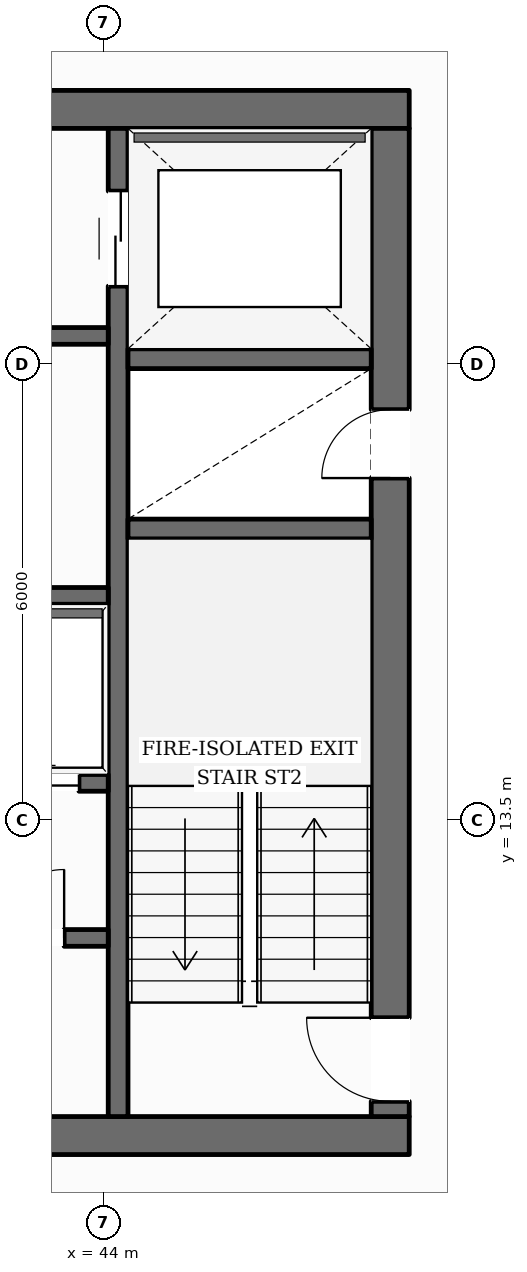
"""IFC4 building model, lengths in metres.
Left out: names, types, materials, properties, quantities, classifications, styles, units other than length and angle.
Written with IfcOpenShell. Run it as: python <this file> out.ifc"""

import sys

from ifc_helpers import new_model, si_unit, direction, frame, frame_2d, origin, place, context, subcontext, project, spatial, rectangle, extrude, element, fill, save


model = new_model("IFC4")
c1 = context("Model", 3, precision=1e-05, world=origin(), true_north=direction((0.0, 1.0)))
c2 = subcontext(c1, "Body", "Model", "MODEL_VIEW")
j1 = project(units=[si_unit("LENGTHUNIT", "METRE"), si_unit("PLANEANGLEUNIT", "RADIAN")], contexts=[c1])
p1 = place(None, origin())
s1 = spatial("IfcSite", under=j1, at=p1, CompositionType="ELEMENT")
p2 = place(p1, origin())
s2 = spatial("IfcBuilding", under=s1, at=p2, CompositionType="ELEMENT")
p3 = place(p2, frame((0.0, 0.0, 150.95)))
s3 = spatial("IfcBuildingStorey", under=s2, at=p3, CompositionType="ELEMENT", Elevation=150.95)
p4 = place(p3, frame((27.98, 9.35, 0.0), z_axis=(0.0, 0.0, 1.0), x_axis=(1.0, 0.0, 0.0)))
e1 = element("IfcWall", 1, at=p4, inside=s3, PredefinedType="SOLIDWALL", context=c2, shape_type="SweptSolid", body=[
    extrude(rectangle(XDim=20.04, YDim=0.5, at=frame_2d((10.02, 0.0))), origin(), (0.0, 0.0, 1.0), 3.43),
])
p5 = place(p4, frame((10.52, 0.0, 0.0)))
e2 = element("IfcOpeningElement", 2, at=p5, cuts=e1, PredefinedType="OPENING", context=c2, shape_type="SweptSolid", body=[
    extrude(rectangle(XDim=1.4, YDim=2.2, at=frame_2d((0.7, 1.1))), frame((0.0, 0.26, 0.0), z_axis=(0.0, -1.0, 0.0), x_axis=(1.0, 0.0, 0.0)), (0.0, 0.0, 1.0), 0.52),
])
p6 = place(p3, frame((27.98, 22.85, 0.0), z_axis=(0.0, 0.0, 1.0), x_axis=(1.0, 0.0, 0.0)))
e3 = element("IfcWall", 3, at=p6, inside=s3, PredefinedType="SOLIDWALL", context=c2, shape_type="SweptSolid", body=[
    extrude(rectangle(XDim=20.04, YDim=0.5, at=frame_2d((10.02, 0.0))), origin(), (0.0, 0.0, 1.0), 3.43),
])
p7 = place(p6, frame((6.295, 0.0, 0.0)))
e4 = element("IfcOpeningElement", 4, at=p7, cuts=e3, PredefinedType="OPENING", context=c2, shape_type="SweptSolid", body=[
    extrude(rectangle(XDim=1.05, YDim=2.15, at=frame_2d((0.525, 1.075))), frame((0.0, 0.26, 0.0), z_axis=(0.0, -1.0, 0.0), x_axis=(1.0, 0.0, 0.0)), (0.0, 0.0, 1.0), 0.52),
])
p8 = place(p6, frame((12.695, 0.0, 0.0)))
e5 = element("IfcOpeningElement", 5, at=p8, cuts=e3, PredefinedType="OPENING", context=c2, shape_type="SweptSolid", body=[
    extrude(rectangle(XDim=1.05, YDim=2.15, at=frame_2d((0.525, 1.075))), frame((0.0, 0.26, 0.0), z_axis=(0.0, -1.0, 0.0), x_axis=(1.0, 0.0, 0.0)), (0.0, 0.0, 1.0), 0.52),
])
p9 = place(p3, frame((47.77, 9.6, 0.0), z_axis=(0.0, 0.0, 1.0), x_axis=(0.0, 1.0, 0.0)))
e6 = element("IfcWall", 6, at=p9, inside=s3, PredefinedType="SOLIDWALL", context=c2, shape_type="SweptSolid", body=[
    extrude(rectangle(XDim=13.0, YDim=0.5, at=frame_2d((6.5, 0.0))), origin(), (0.0, 0.0, 1.0), 3.43),
])
p10 = place(p9, frame((0.2, 0.0, 0.0)))
e7 = element("IfcOpeningElement", 7, at=p10, cuts=e6, PredefinedType="OPENING", context=c2, shape_type="SweptSolid", body=[
    extrude(rectangle(XDim=1.1, YDim=2.15, at=frame_2d((0.55, 1.075))), frame((0.0, 0.26, 0.0), z_axis=(0.0, -1.0, 0.0), x_axis=(1.0, 0.0, 0.0)), (0.0, 0.0, 1.0), 0.52),
])
p11 = place(p9, frame((8.4, 0.0, 0.0)))
e8 = element("IfcOpeningElement", 8, at=p11, cuts=e6, PredefinedType="OPENING", context=c2, shape_type="SweptSolid", body=[
    extrude(rectangle(XDim=0.9, YDim=2.1, at=frame_2d((0.45, 1.05))), frame((0.0, 0.26, 0.0), z_axis=(0.0, -1.0, 0.0), x_axis=(1.0, 0.0, 0.0)), (0.0, 0.0, 1.0), 0.52),
])
p12 = place(p3, frame((44.19, 9.6, 0.0), z_axis=(0.0, 0.0, 1.0), x_axis=(0.0, 1.0, 0.0)))
e9 = element("IfcWall", 9, at=p12, inside=s3, PredefinedType="SHEAR", context=c2, shape_type="SweptSolid", body=[
    extrude(rectangle(XDim=13.0, YDim=0.26, at=frame_2d((6.5, 0.0))), origin(), (0.0, 0.0, 1.0), 3.43),
])
p13 = place(p12, frame((10.925, 0.0, 0.0)))
e10 = element("IfcOpeningElement", 10, at=p13, cuts=e9, PredefinedType="OPENING", context=c2, shape_type="SweptSolid", body=[
    extrude(rectangle(XDim=1.25, YDim=2.25, at=frame_2d((0.625, 1.125))), frame((0.0, 0.14, 0.0), z_axis=(0.0, -1.0, 0.0), x_axis=(1.0, 0.0, 0.0)), (0.0, 0.0, 1.0), 0.28),
])
for number, where, z_axis, x_axis in (
    (11, (44.32, 17.33, 0.0), (0.0, 0.0, 1.0), (1.0, 0.0, 0.0)),
    (12, (44.32, 19.57, 0.0), (0.0, 0.0, 1.0), (1.0, 0.0, 0.0)),
):
    element("IfcWall", number, at=place(p3, frame(where, z_axis=z_axis, x_axis=x_axis)), inside=s3, PredefinedType="SHEAR", context=c2, shape_type="SweptSolid", body=[
        extrude(rectangle(XDim=3.2, YDim=0.26, at=frame_2d((1.6, 0.0))), origin(), (0.0, 0.0, 1.0), 3.43),
    ])
p14 = place(p3, frame((31.94, 19.87, 0.0), z_axis=(0.0, 0.0, 1.0), x_axis=(1.0, 0.0, 0.0)))
e13 = element("IfcWall", 13, at=p14, inside=s3, PredefinedType="SOLIDWALL", context=c2, shape_type="SweptSolid", body=[
    extrude(rectangle(XDim=12.12, YDim=0.22, at=frame_2d((6.06, 0.0))), origin(), (0.0, 0.0, 1.0), 3.43),
])
p15 = place(p14, frame((6.3, 0.0, 0.0)))
e14 = element("IfcOpeningElement", 14, at=p15, cuts=e13, PredefinedType="OPENING", context=c2, shape_type="SweptSolid", body=[
    extrude(rectangle(XDim=1.1, YDim=2.15, at=frame_2d((0.55, 1.075))), frame((0.0, 0.12, 0.0), z_axis=(0.0, -1.0, 0.0), x_axis=(1.0, 0.0, 0.0)), (0.0, 0.0, 1.0), 0.24),
])
p16 = place(p14, frame((8.01, 0.0, 0.0)))
e15 = element("IfcOpeningElement", 15, at=p16, cuts=e13, PredefinedType="OPENING", context=c2, shape_type="SweptSolid", body=[
    extrude(rectangle(XDim=0.9, YDim=2.1, at=frame_2d((0.45, 1.05))), frame((0.0, 0.12, 0.0), z_axis=(0.0, -1.0, 0.0), x_axis=(1.0, 0.0, 0.0)), (0.0, 0.0, 1.0), 0.24),
])
p17 = place(p14, frame((10.21, 0.0, 0.0)))
e16 = element("IfcOpeningElement", 16, at=p17, cuts=e13, PredefinedType="OPENING", context=c2, shape_type="SweptSolid", body=[
    extrude(rectangle(XDim=0.9, YDim=2.1, at=frame_2d((0.45, 1.05))), frame((0.0, 0.12, 0.0), z_axis=(0.0, -1.0, 0.0), x_axis=(1.0, 0.0, 0.0)), (0.0, 0.0, 1.0), 0.24),
])
p18 = place(p3, frame((31.94, 16.45, 0.0), z_axis=(0.0, 0.0, 1.0), x_axis=(1.0, 0.0, 0.0)))
e17 = element("IfcWall", 17, at=p18, inside=s3, PredefinedType="SOLIDWALL", context=c2, shape_type="SweptSolid", body=[
    extrude(rectangle(XDim=12.12, YDim=0.22, at=frame_2d((6.06, 0.0))), origin(), (0.0, 0.0, 1.0), 3.43),
])
p19 = place(p3, frame((31.94, 13.99, 0.0), z_axis=(0.0, 0.0, 1.0), x_axis=(1.0, 0.0, 0.0)))
e18 = element("IfcWall", 18, at=p19, inside=s3, PredefinedType="SOLIDWALL", context=c2, shape_type="SweptSolid", body=[
    extrude(rectangle(XDim=12.12, YDim=0.22, at=frame_2d((6.06, 0.0))), origin(), (0.0, 0.0, 1.0), 3.43),
])
p20 = place(p19, frame((2.51, 0.0, 0.0)))
e19 = element("IfcOpeningElement", 19, at=p20, cuts=e18, PredefinedType="OPENING", context=c2, shape_type="SweptSolid", body=[
    extrude(rectangle(XDim=0.9, YDim=2.1, at=frame_2d((0.45, 1.05))), frame((0.0, 0.12, 0.0), z_axis=(0.0, -1.0, 0.0), x_axis=(1.0, 0.0, 0.0)), (0.0, 0.0, 1.0), 0.24),
])
p21 = place(p19, frame((6.535, 0.0, 0.0)))
e20 = element("IfcOpeningElement", 20, at=p21, cuts=e18, PredefinedType="OPENING", context=c2, shape_type="SweptSolid", body=[
    extrude(rectangle(XDim=1.1, YDim=2.2, at=frame_2d((0.55, 1.1))), frame((0.0, 0.12, 0.0), z_axis=(0.0, -1.0, 0.0), x_axis=(1.0, 0.0, 0.0)), (0.0, 0.0, 1.0), 0.24),
])
p22 = place(p19, frame((8.585, 0.0, 0.0)))
e21 = element("IfcOpeningElement", 21, at=p22, cuts=e18, PredefinedType="OPENING", context=c2, shape_type="SweptSolid", body=[
    extrude(rectangle(XDim=1.1, YDim=2.2, at=frame_2d((0.55, 1.1))), frame((0.0, 0.12, 0.0), z_axis=(0.0, -1.0, 0.0), x_axis=(1.0, 0.0, 0.0)), (0.0, 0.0, 1.0), 0.24),
])
p23 = place(p19, frame((10.635, 0.0, 0.0)))
e22 = element("IfcOpeningElement", 22, at=p23, cuts=e18, PredefinedType="OPENING", context=c2, shape_type="SweptSolid", body=[
    extrude(rectangle(XDim=1.1, YDim=2.2, at=frame_2d((0.55, 1.1))), frame((0.0, 0.12, 0.0), z_axis=(0.0, -1.0, 0.0), x_axis=(1.0, 0.0, 0.0)), (0.0, 0.0, 1.0), 0.24),
])
p24 = place(p3, frame((40.28, 11.95, 0.0), z_axis=(0.0, 0.0, 1.0), x_axis=(1.0, 0.0, 0.0)))
e23 = element("IfcWall", 23, at=p24, inside=s3, PredefinedType="SOLIDWALL", context=c2, shape_type="SweptSolid", body=[
    extrude(rectangle(XDim=3.78, YDim=0.22, at=frame_2d((1.89, 0.0))), origin(), (0.0, 0.0, 1.0), 3.43),
])
p25 = place(p24, frame((0.47, 0.0, 0.0)))
e24 = element("IfcOpeningElement", 24, at=p25, cuts=e23, PredefinedType="OPENING", context=c2, shape_type="SweptSolid", body=[
    extrude(rectangle(XDim=0.9, YDim=2.1, at=frame_2d((0.45, 1.05))), frame((0.0, 0.12, 0.0), z_axis=(0.0, -1.0, 0.0), x_axis=(1.0, 0.0, 0.0)), (0.0, 0.0, 1.0), 0.24),
])
p26 = place(p24, frame((2.3, 0.0, 0.0)))
e25 = element("IfcOpeningElement", 25, at=p26, cuts=e23, PredefinedType="OPENING", context=c2, shape_type="SweptSolid", body=[
    extrude(rectangle(XDim=0.9, YDim=2.1, at=frame_2d((0.45, 1.05))), frame((0.0, 0.12, 0.0), z_axis=(0.0, -1.0, 0.0), x_axis=(1.0, 0.0, 0.0)), (0.0, 0.0, 1.0), 0.24),
])
p27 = place(p3, frame((43.179, 45.396, 0.0), z_axis=(0.0, 0.0, 1.0), x_axis=(0.494363218784, -0.869255433065, 0.0)))
e26 = element("IfcWall", 26, at=p27, inside=s3, PredefinedType="STANDARD", context=c2, shape_type="SweptSolid", body=[
    extrude(rectangle(XDim=38.134, YDim=0.38, at=frame_2d((19.067, 0.0))), origin(), (0.0, 0.0, 1.0), 2.889),
])
p28 = place(p27, frame((9.134, 0.0, 0.0)))
e27 = element("IfcOpeningElement", 27, at=p28, cuts=e26, PredefinedType="OPENING", context=c2, shape_type="SweptSolid", body=[
    extrude(rectangle(XDim=1.0, YDim=2.2, at=frame_2d((0.5, 1.1))), frame((0.0, 0.2, 0.0), z_axis=(0.0, -1.0, 0.0), x_axis=(1.0, 0.0, 0.0)), (0.0, 0.0, 1.0), 0.4),
])
p29 = place(p27, frame((33.785, 0.0, 0.55)))
e28 = element("IfcOpeningElement", 28, at=p29, cuts=e26, PredefinedType="OPENING", context=c2, shape_type="SweptSolid", body=[
    extrude(rectangle(XDim=1.55, YDim=1.6, at=frame_2d((0.775, 0.8))), frame((0.0, 0.2, 0.0), z_axis=(0.0, -1.0, 0.0), x_axis=(1.0, 0.0, 0.0)), (0.0, 0.0, 1.0), 0.4),
])
p30 = place(p27, frame((27.589, 0.0, 0.55)))
e29 = element("IfcOpeningElement", 29, at=p30, cuts=e26, PredefinedType="OPENING", context=c2, shape_type="SweptSolid", body=[
    extrude(rectangle(XDim=1.55, YDim=1.6, at=frame_2d((0.775, 0.8))), frame((0.0, 0.2, 0.0), z_axis=(0.0, -1.0, 0.0), x_axis=(1.0, 0.0, 0.0)), (0.0, 0.0, 1.0), 0.4),
])
p31 = place(p27, frame((21.393, 0.0, 0.55)))
e30 = element("IfcOpeningElement", 30, at=p31, cuts=e26, PredefinedType="OPENING", context=c2, shape_type="SweptSolid", body=[
    extrude(rectangle(XDim=1.55, YDim=1.6, at=frame_2d((0.775, 0.8))), frame((0.0, 0.2, 0.0), z_axis=(0.0, -1.0, 0.0), x_axis=(1.0, 0.0, 0.0)), (0.0, 0.0, 1.0), 0.4),
])
p32 = place(p27, frame((2.805, 0.0, 0.55)))
e31 = element("IfcOpeningElement", 31, at=p32, cuts=e26, PredefinedType="OPENING", context=c2, shape_type="SweptSolid", body=[
    extrude(rectangle(XDim=1.55, YDim=1.6, at=frame_2d((0.775, 0.8))), frame((0.0, 0.2, 0.0), z_axis=(0.0, -1.0, 0.0), x_axis=(1.0, 0.0, 0.0)), (0.0, 0.0, 1.0), 0.4),
])
p33 = place(p10, origin())
e32 = element("IfcDoor", 32, at=p33, inside=s3, OperationType="SINGLE_SWING_RIGHT", PredefinedType="DOOR", context=c2, shape_type="SweptSolid", body=[
    extrude(rectangle(XDim=1.1, YDim=2.15, at=frame_2d((0.55, 1.075))), frame((0.0, 0.025, 0.0), z_axis=(0.0, -1.0, 0.0), x_axis=(1.0, 0.0, 0.0)), (0.0, 0.0, 1.0), 0.05),
])
fill(e7, e32)
p34 = place(p11, origin())
e33 = element("IfcDoor", 33, at=p34, inside=s3, OperationType="SINGLE_SWING_LEFT", PredefinedType="DOOR", context=c2, shape_type="SweptSolid", body=[
    extrude(rectangle(XDim=0.9, YDim=2.1, at=frame_2d((0.45, 1.05))), frame((0.0, 0.025, 0.0), z_axis=(0.0, -1.0, 0.0), x_axis=(1.0, 0.0, 0.0)), (0.0, 0.0, 1.0), 0.05),
])
fill(e8, e33)
p35 = place(p13, origin())
e34 = element("IfcDoor", 34, at=p35, inside=s3, OperationType="DOUBLE_DOOR_SLIDING", PredefinedType="DOOR", context=c2, shape_type="SweptSolid", body=[
    extrude(rectangle(XDim=1.25, YDim=2.25, at=frame_2d((0.625, 1.125))), frame((0.0, 0.025, 0.0), z_axis=(0.0, -1.0, 0.0), x_axis=(1.0, 0.0, 0.0)), (0.0, 0.0, 1.0), 0.05),
])
fill(e10, e34)
p36 = place(p23, origin())
e35 = element("IfcDoor", 35, at=p36, inside=s3, OperationType="DOUBLE_DOOR_SLIDING", PredefinedType="DOOR", context=c2, shape_type="SweptSolid", body=[
    extrude(rectangle(XDim=1.1, YDim=2.2, at=frame_2d((0.55, 1.1))), frame((0.0, 0.025, 0.0), z_axis=(0.0, -1.0, 0.0), x_axis=(1.0, 0.0, 0.0)), (0.0, 0.0, 1.0), 0.05),
])
fill(e22, e35)
p37 = place(p26, origin())
e36 = element("IfcDoor", 36, at=p37, inside=s3, OperationType="SINGLE_SWING_RIGHT", PredefinedType="DOOR", context=c2, shape_type="SweptSolid", body=[
    extrude(rectangle(XDim=0.9, YDim=2.1, at=frame_2d((0.45, 1.05))), frame((0.0, 0.025, 0.0), z_axis=(0.0, -1.0, 0.0), x_axis=(1.0, 0.0, 0.0)), (0.0, 0.0, 1.0), 0.05),
])
fill(e25, e36)
save(model, sys.argv[1])
